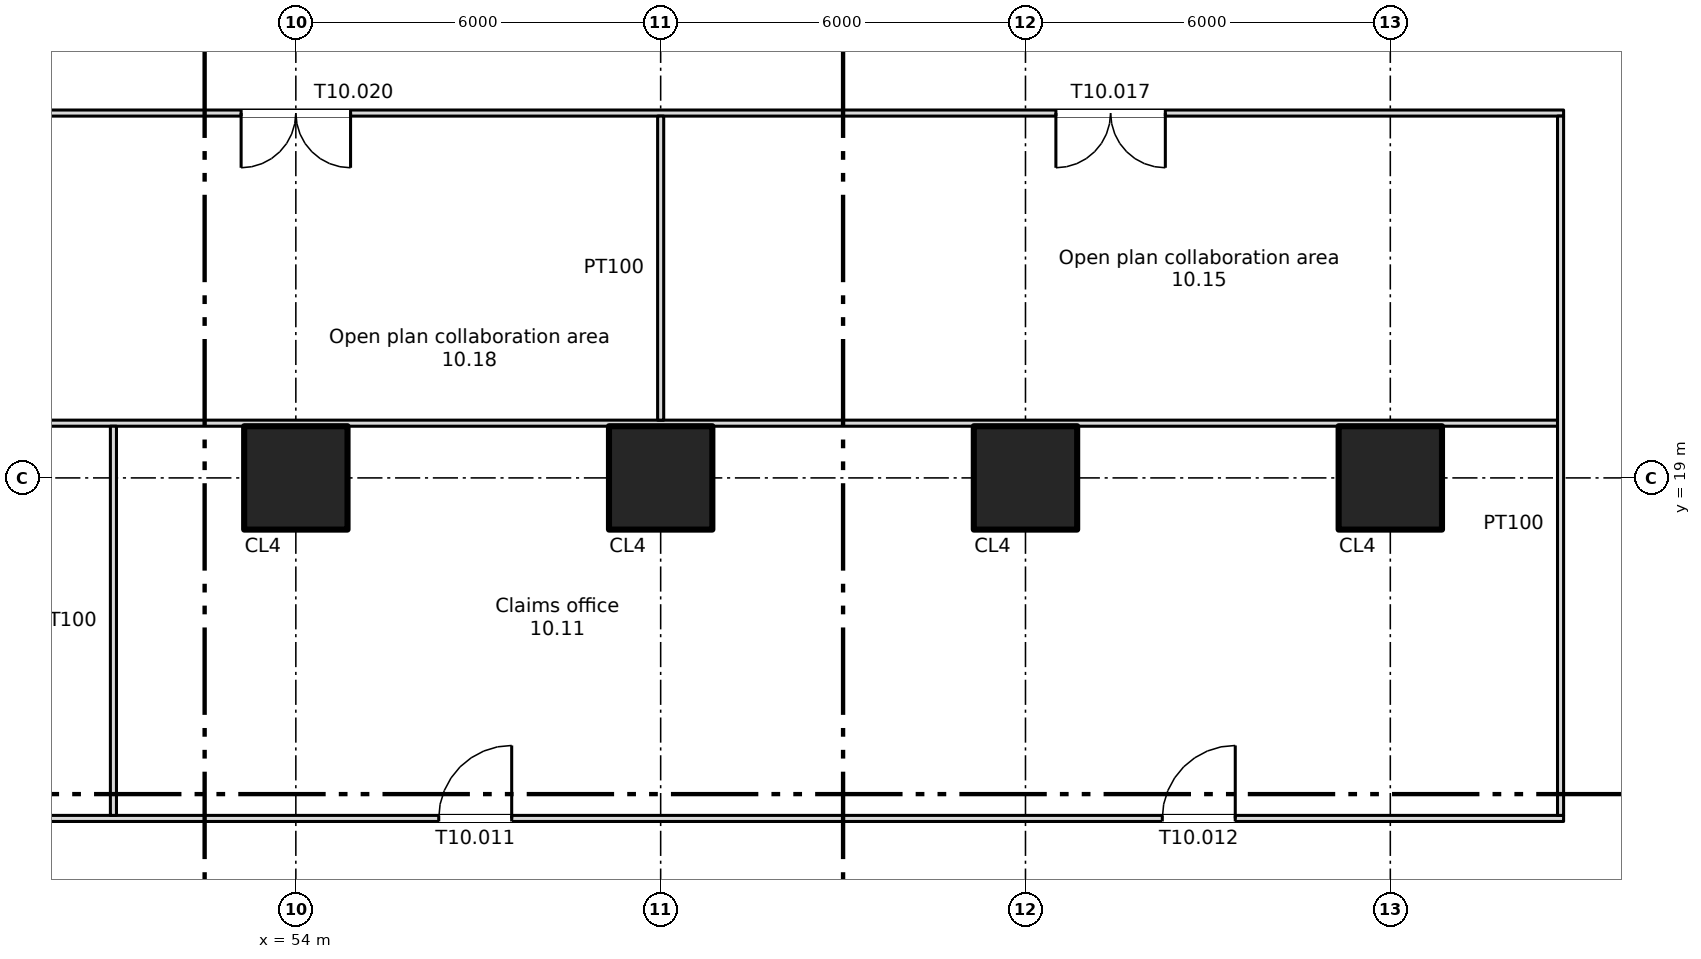
"""IFC4 building model, lengths in metres.
Left out: names, types, materials, properties, quantities, classifications, styles, units other than length and angle.
Written with IfcOpenShell. Run it as: python <this file> out.ifc"""

import sys

from ifc_helpers import new_model, si_unit, direction, frame, frame_2d, origin, origin_2d, place, context, subcontext, project, spatial, rectangle, extrude, element, fill, save


model = new_model("IFC4")
c1 = context("Model", 3, precision=1e-05, world=origin(), true_north=direction((0.0, 1.0)))
c2 = subcontext(c1, "Body", "Model", "MODEL_VIEW")
j1 = project(units=[si_unit("LENGTHUNIT", "METRE"), si_unit("PLANEANGLEUNIT", "RADIAN")], contexts=[c1])
p1 = place(None, origin())
s1 = spatial("IfcSite", under=j1, at=p1, CompositionType="ELEMENT")
p2 = place(p1, origin())
s2 = spatial("IfcBuilding", under=s1, at=p2, CompositionType="ELEMENT")
p3 = place(p2, frame((0.0, 0.0, 45.0)))
s3 = spatial("IfcBuildingStorey", under=s2, at=p3, CompositionType="ELEMENT", Elevation=45.0)
for number, where, z_axis, x_axis in (
    (1, (54.0, 19.0, 0.0), (0.0, 0.0, 1.0), (1.0, 0.0, 0.0)),
    (2, (60.0, 19.0, 0.0), (0.0, 0.0, 1.0), (1.0, 0.0, 0.0)),
    (3, (66.0, 19.0, 0.0), (0.0, 0.0, 1.0), (1.0, 0.0, 0.0)),
    (4, (72.0, 19.0, 0.0), (0.0, 0.0, 1.0), (1.0, 0.0, 0.0)),
):
    element("IfcColumn", number, at=place(p3, frame(where, z_axis=z_axis, x_axis=x_axis)), inside=s3, PredefinedType="COLUMN", context=c2, shape_type="SweptSolid", body=[
        extrude(rectangle(XDim=1.7, YDim=1.7, at=origin_2d()), origin(), (0.0, 0.0, 1.0), 3.35),
    ])
p4 = place(p3, frame((3.15, 13.4, 0.0), z_axis=(0.0, 0.0, 1.0), x_axis=(1.0, 0.0, 0.0)))
e5 = element("IfcWall", 5, at=p4, inside=s3, PredefinedType="PARTITIONING", context=c2, shape_type="SweptSolid", body=[
    extrude(rectangle(XDim=71.7, YDim=0.1, at=frame_2d((35.85, 0.0))), origin(), (0.0, 0.0, 1.0), 3.35),
])
p5 = place(p4, frame((5.4, 0.0, 0.0)))
e6 = element("IfcOpeningElement", 6, at=p5, cuts=e5, PredefinedType="OPENING", context=c2, shape_type="SweptSolid", body=[
    extrude(rectangle(XDim=1.2, YDim=2.1, at=frame_2d((0.6, 1.05))), frame((0.0, 0.06, 0.0), z_axis=(0.0, -1.0, 0.0), x_axis=(1.0, 0.0, 0.0)), (0.0, 0.0, 1.0), 0.12),
])
p6 = place(p4, frame((17.3, 0.0, 0.0)))
e7 = element("IfcOpeningElement", 7, at=p6, cuts=e5, PredefinedType="OPENING", context=c2, shape_type="SweptSolid", body=[
    extrude(rectangle(XDim=1.2, YDim=2.1, at=frame_2d((0.6, 1.05))), frame((0.0, 0.06, 0.0), z_axis=(0.0, -1.0, 0.0), x_axis=(1.0, 0.0, 0.0)), (0.0, 0.0, 1.0), 0.12),
])
p7 = place(p4, frame((53.2, 0.0, 0.0)))
e8 = element("IfcOpeningElement", 8, at=p7, cuts=e5, PredefinedType="OPENING", context=c2, shape_type="SweptSolid", body=[
    extrude(rectangle(XDim=1.2, YDim=2.1, at=frame_2d((0.6, 1.05))), frame((0.0, 0.06, 0.0), z_axis=(0.0, -1.0, 0.0), x_axis=(1.0, 0.0, 0.0)), (0.0, 0.0, 1.0), 0.12),
])
p8 = place(p4, frame((65.1, 0.0, 0.0)))
e9 = element("IfcOpeningElement", 9, at=p8, cuts=e5, PredefinedType="OPENING", context=c2, shape_type="SweptSolid", body=[
    extrude(rectangle(XDim=1.2, YDim=2.1, at=frame_2d((0.6, 1.05))), frame((0.0, 0.06, 0.0), z_axis=(0.0, -1.0, 0.0), x_axis=(1.0, 0.0, 0.0)), (0.0, 0.0, 1.0), 0.12),
])
p9 = place(p4, frame((29.25, 0.0, 0.0)))
e10 = element("IfcOpeningElement", 10, at=p9, cuts=e5, PredefinedType="OPENING", context=c2, shape_type="SweptSolid", body=[
    extrude(rectangle(XDim=1.2, YDim=2.1, at=frame_2d((0.6, 1.05))), frame((0.0, 0.06, 0.0), z_axis=(0.0, -1.0, 0.0), x_axis=(1.0, 0.0, 0.0)), (0.0, 0.0, 1.0), 0.12),
])
p10 = place(p4, frame((41.25, 0.0, 0.0)))
e11 = element("IfcOpeningElement", 11, at=p10, cuts=e5, PredefinedType="OPENING", context=c2, shape_type="SweptSolid", body=[
    extrude(rectangle(XDim=1.2, YDim=2.1, at=frame_2d((0.6, 1.05))), frame((0.0, 0.06, 0.0), z_axis=(0.0, -1.0, 0.0), x_axis=(1.0, 0.0, 0.0)), (0.0, 0.0, 1.0), 0.12),
])
p11 = place(p3, frame((3.25, 19.9, 0.0), z_axis=(0.0, 0.0, 1.0), x_axis=(1.0, 0.0, 0.0)))
e12 = element("IfcWall", 12, at=p11, inside=s3, PredefinedType="PARTITIONING", context=c2, shape_type="SweptSolid", body=[
    extrude(rectangle(XDim=71.5, YDim=0.1, at=frame_2d((35.75, 0.0))), origin(), (0.0, 0.0, 1.0), 3.35),
])
p12 = place(p3, frame((3.15, 25.0, 0.0), z_axis=(0.0, 0.0, 1.0), x_axis=(1.0, 0.0, 0.0)))
e13 = element("IfcWall", 13, at=p12, inside=s3, PredefinedType="PARTITIONING", context=c2, shape_type="SweptSolid", body=[
    extrude(rectangle(XDim=71.7, YDim=0.1, at=frame_2d((35.85, 0.0))), origin(), (0.0, 0.0, 1.0), 3.35),
])
p13 = place(p12, frame((5.45, 0.0, 0.0)))
e14 = element("IfcOpeningElement", 14, at=p13, cuts=e13, PredefinedType="OPENING", context=c2, shape_type="SweptSolid", body=[
    extrude(rectangle(XDim=1.0, YDim=2.1, at=frame_2d((0.5, 1.05))), frame((0.0, 0.06, 0.0), z_axis=(0.0, -1.0, 0.0), x_axis=(1.0, 0.0, 0.0)), (0.0, 0.0, 1.0), 0.12),
])
p14 = place(p12, frame((15.85, 0.0, 0.0)))
e15 = element("IfcOpeningElement", 15, at=p14, cuts=e13, PredefinedType="OPENING", context=c2, shape_type="SweptSolid", body=[
    extrude(rectangle(XDim=1.0, YDim=2.1, at=frame_2d((0.5, 1.05))), frame((0.0, 0.06, 0.0), z_axis=(0.0, -1.0, 0.0), x_axis=(1.0, 0.0, 0.0)), (0.0, 0.0, 1.0), 0.12),
])
p15 = place(p12, frame((63.35, 0.0, 0.0)))
e16 = element("IfcOpeningElement", 16, at=p15, cuts=e13, PredefinedType="OPENING", context=c2, shape_type="SweptSolid", body=[
    extrude(rectangle(XDim=1.8, YDim=2.1, at=frame_2d((0.9, 1.05))), frame((0.0, 0.06, 0.0), z_axis=(0.0, -1.0, 0.0), x_axis=(1.0, 0.0, 0.0)), (0.0, 0.0, 1.0), 0.12),
])
p16 = place(p12, frame((25.95, 0.0, 0.0)))
e17 = element("IfcOpeningElement", 17, at=p16, cuts=e13, PredefinedType="OPENING", context=c2, shape_type="SweptSolid", body=[
    extrude(rectangle(XDim=1.8, YDim=2.1, at=frame_2d((0.9, 1.05))), frame((0.0, 0.06, 0.0), z_axis=(0.0, -1.0, 0.0), x_axis=(1.0, 0.0, 0.0)), (0.0, 0.0, 1.0), 0.12),
])
p17 = place(p12, frame((37.95, 0.0, 0.0)))
e18 = element("IfcOpeningElement", 18, at=p17, cuts=e13, PredefinedType="OPENING", context=c2, shape_type="SweptSolid", body=[
    extrude(rectangle(XDim=1.8, YDim=2.1, at=frame_2d((0.9, 1.05))), frame((0.0, 0.06, 0.0), z_axis=(0.0, -1.0, 0.0), x_axis=(1.0, 0.0, 0.0)), (0.0, 0.0, 1.0), 0.12),
])
p18 = place(p12, frame((49.95, 0.0, 0.0)))
e19 = element("IfcOpeningElement", 19, at=p18, cuts=e13, PredefinedType="OPENING", context=c2, shape_type="SweptSolid", body=[
    extrude(rectangle(XDim=1.8, YDim=2.1, at=frame_2d((0.9, 1.05))), frame((0.0, 0.06, 0.0), z_axis=(0.0, -1.0, 0.0), x_axis=(1.0, 0.0, 0.0)), (0.0, 0.0, 1.0), 0.12),
])
p19 = place(p3, frame((51.0, 13.45, 0.0), z_axis=(0.0, 0.0, 1.0), x_axis=(0.0, 1.0, 0.0)))
e20 = element("IfcWall", 20, at=p19, inside=s3, PredefinedType="PARTITIONING", context=c2, shape_type="SweptSolid", body=[
    extrude(rectangle(XDim=6.4, YDim=0.1, at=frame_2d((3.2, 0.0))), origin(), (0.0, 0.0, 1.0), 3.35),
])
p20 = place(p3, frame((60.0, 19.95, 0.0), z_axis=(0.0, 0.0, 1.0), x_axis=(0.0, 1.0, 0.0)))
e21 = element("IfcWall", 21, at=p20, inside=s3, PredefinedType="PARTITIONING", context=c2, shape_type="SweptSolid", body=[
    extrude(rectangle(XDim=5.0, YDim=0.1, at=frame_2d((2.5, 0.0))), origin(), (0.0, 0.0, 1.0), 3.35),
])
p21 = place(p3, frame((74.8, 13.45, 0.0), z_axis=(0.0, 0.0, 1.0), x_axis=(0.0, 1.0, 0.0)))
e22 = element("IfcWall", 22, at=p21, inside=s3, PredefinedType="PARTITIONING", context=c2, shape_type="SweptSolid", body=[
    extrude(rectangle(XDim=11.5, YDim=0.1, at=frame_2d((5.75, 0.0))), origin(), (0.0, 0.0, 1.0), 3.35),
])
p22 = place(p7, origin())
e23 = element("IfcDoor", 23, at=p22, inside=s3, OperationType="SINGLE_SWING_RIGHT", PredefinedType="DOOR", context=c2, shape_type="SweptSolid", body=[
    extrude(rectangle(XDim=1.2, YDim=2.1, at=frame_2d((0.6, 1.05))), frame((0.0, 0.025, 0.0), z_axis=(0.0, -1.0, 0.0), x_axis=(1.0, 0.0, 0.0)), (0.0, 0.0, 1.0), 0.05),
])
fill(e8, e23)
p23 = place(p8, origin())
e24 = element("IfcDoor", 24, at=p23, inside=s3, OperationType="SINGLE_SWING_RIGHT", PredefinedType="DOOR", context=c2, shape_type="SweptSolid", body=[
    extrude(rectangle(XDim=1.2, YDim=2.1, at=frame_2d((0.6, 1.05))), frame((0.0, 0.025, 0.0), z_axis=(0.0, -1.0, 0.0), x_axis=(1.0, 0.0, 0.0)), (0.0, 0.0, 1.0), 0.05),
])
fill(e9, e24)
p24 = place(p15, origin())
e25 = element("IfcDoor", 25, at=p24, inside=s3, OperationType="DOUBLE_DOOR_SINGLE_SWING", PredefinedType="DOOR", context=c2, shape_type="SweptSolid", body=[
    extrude(rectangle(XDim=1.8, YDim=2.1, at=frame_2d((0.9, 1.05))), frame((0.0, 0.025, 0.0), z_axis=(0.0, -1.0, 0.0), x_axis=(1.0, 0.0, 0.0)), (0.0, 0.0, 1.0), 0.05),
])
fill(e16, e25)
p25 = place(p18, origin())
e26 = element("IfcDoor", 26, at=p25, inside=s3, OperationType="DOUBLE_DOOR_SINGLE_SWING", PredefinedType="DOOR", context=c2, shape_type="SweptSolid", body=[
    extrude(rectangle(XDim=1.8, YDim=2.1, at=frame_2d((0.9, 1.05))), frame((0.0, 0.025, 0.0), z_axis=(0.0, -1.0, 0.0), x_axis=(1.0, 0.0, 0.0)), (0.0, 0.0, 1.0), 0.05),
])
fill(e19, e26)
save(model, sys.argv[1])
